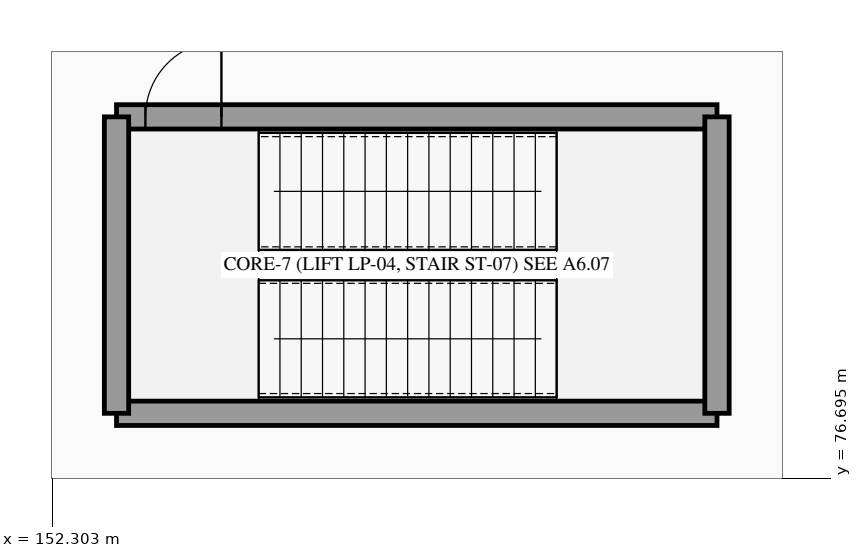
"""IFC4 building model, lengths in metres.
Left out: names, types, materials, properties, quantities, classifications, styles, units other than length and angle.
Written with IfcOpenShell. Run it as: python <this file> out.ifc"""

import sys

from ifc_helpers import new_model, si_unit, direction, frame, frame_2d, origin, place, context, subcontext, project, spatial, rectangle, extrude, element, fill, save


model = new_model("IFC4")
c1 = context("Model", 3, precision=1e-05, world=origin(), true_north=direction((0.0, 1.0)))
c2 = subcontext(c1, "Body", "Model", "MODEL_VIEW")
j1 = project(units=[si_unit("LENGTHUNIT", "METRE"), si_unit("PLANEANGLEUNIT", "RADIAN")], contexts=[c1])
p1 = place(None, origin())
s1 = spatial("IfcSite", under=j1, at=p1, CompositionType="ELEMENT")
p2 = place(p1, origin())
s2 = spatial("IfcBuilding", under=s1, at=p2, CompositionType="ELEMENT")
p3 = place(p2, origin())
s3 = spatial("IfcBuildingStorey", under=s2, at=p3, CompositionType="ELEMENT", Elevation=0.0)
p4 = place(p3, frame((153.15, 77.55, 0.0), z_axis=(0.0, 0.0, 1.0), x_axis=(1.0, 0.0, 0.0)))
e1 = element("IfcWall", 1, at=p4, inside=s3, PredefinedType="SHEAR", context=c2, shape_type="SweptSolid", body=[
    extrude(rectangle(XDim=7.9, YDim=0.32, at=frame_2d((3.95, 0.0))), origin(), (0.0, 0.0, 1.0), 5.4),
])
p5 = place(p3, frame((153.15, 81.45, 0.0), z_axis=(0.0, 0.0, 1.0), x_axis=(1.0, 0.0, 0.0)))
e2 = element("IfcWall", 2, at=p5, inside=s3, PredefinedType="SHEAR", context=c2, shape_type="SweptSolid", body=[
    extrude(rectangle(XDim=7.9, YDim=0.32, at=frame_2d((3.95, 0.0))), origin(), (0.0, 0.0, 1.0), 5.4),
])
p6 = place(p5, frame((0.38, 0.0, 0.0)))
e3 = element("IfcOpeningElement", 3, at=p6, cuts=e2, PredefinedType="OPENING", context=c2, shape_type="SweptSolid", body=[
    extrude(rectangle(XDim=1.0, YDim=2.15, at=frame_2d((0.5, 1.075))), frame((0.0, 0.17, 0.0), z_axis=(0.0, -1.0, 0.0), x_axis=(1.0, 0.0, 0.0)), (0.0, 0.0, 1.0), 0.34),
])
for number, where, z_axis, x_axis in (
    (4, (153.15, 77.55, 0.0), (0.0, 0.0, 1.0), (0.0, 1.0, 0.0)),
    (5, (161.05, 77.55, 0.0), (0.0, 0.0, 1.0), (0.0, 1.0, 0.0)),
):
    element("IfcWall", number, at=place(p3, frame(where, z_axis=z_axis, x_axis=x_axis)), inside=s3, PredefinedType="SHEAR", context=c2, shape_type="SweptSolid", body=[
        extrude(rectangle(XDim=3.9, YDim=0.32, at=frame_2d((1.95, 0.0))), origin(), (0.0, 0.0, 1.0), 5.4),
    ])
p7 = place(p6, frame((1.0, 0.0, 0.0), z_axis=(0.0, 0.0, 1.0), x_axis=(-1.0, 0.0, 0.0)))
e6 = element("IfcDoor", 6, at=p7, inside=s3, OperationType="SINGLE_SWING_RIGHT", PredefinedType="DOOR", context=c2, shape_type="SweptSolid", body=[
    extrude(rectangle(XDim=1.0, YDim=2.15, at=frame_2d((0.5, 1.075))), frame((0.0, 0.025, 0.0), z_axis=(0.0, -1.0, 0.0), x_axis=(1.0, 0.0, 0.0)), (0.0, 0.0, 1.0), 0.05),
])
fill(e3, e6)
save(model, sys.argv[1])
